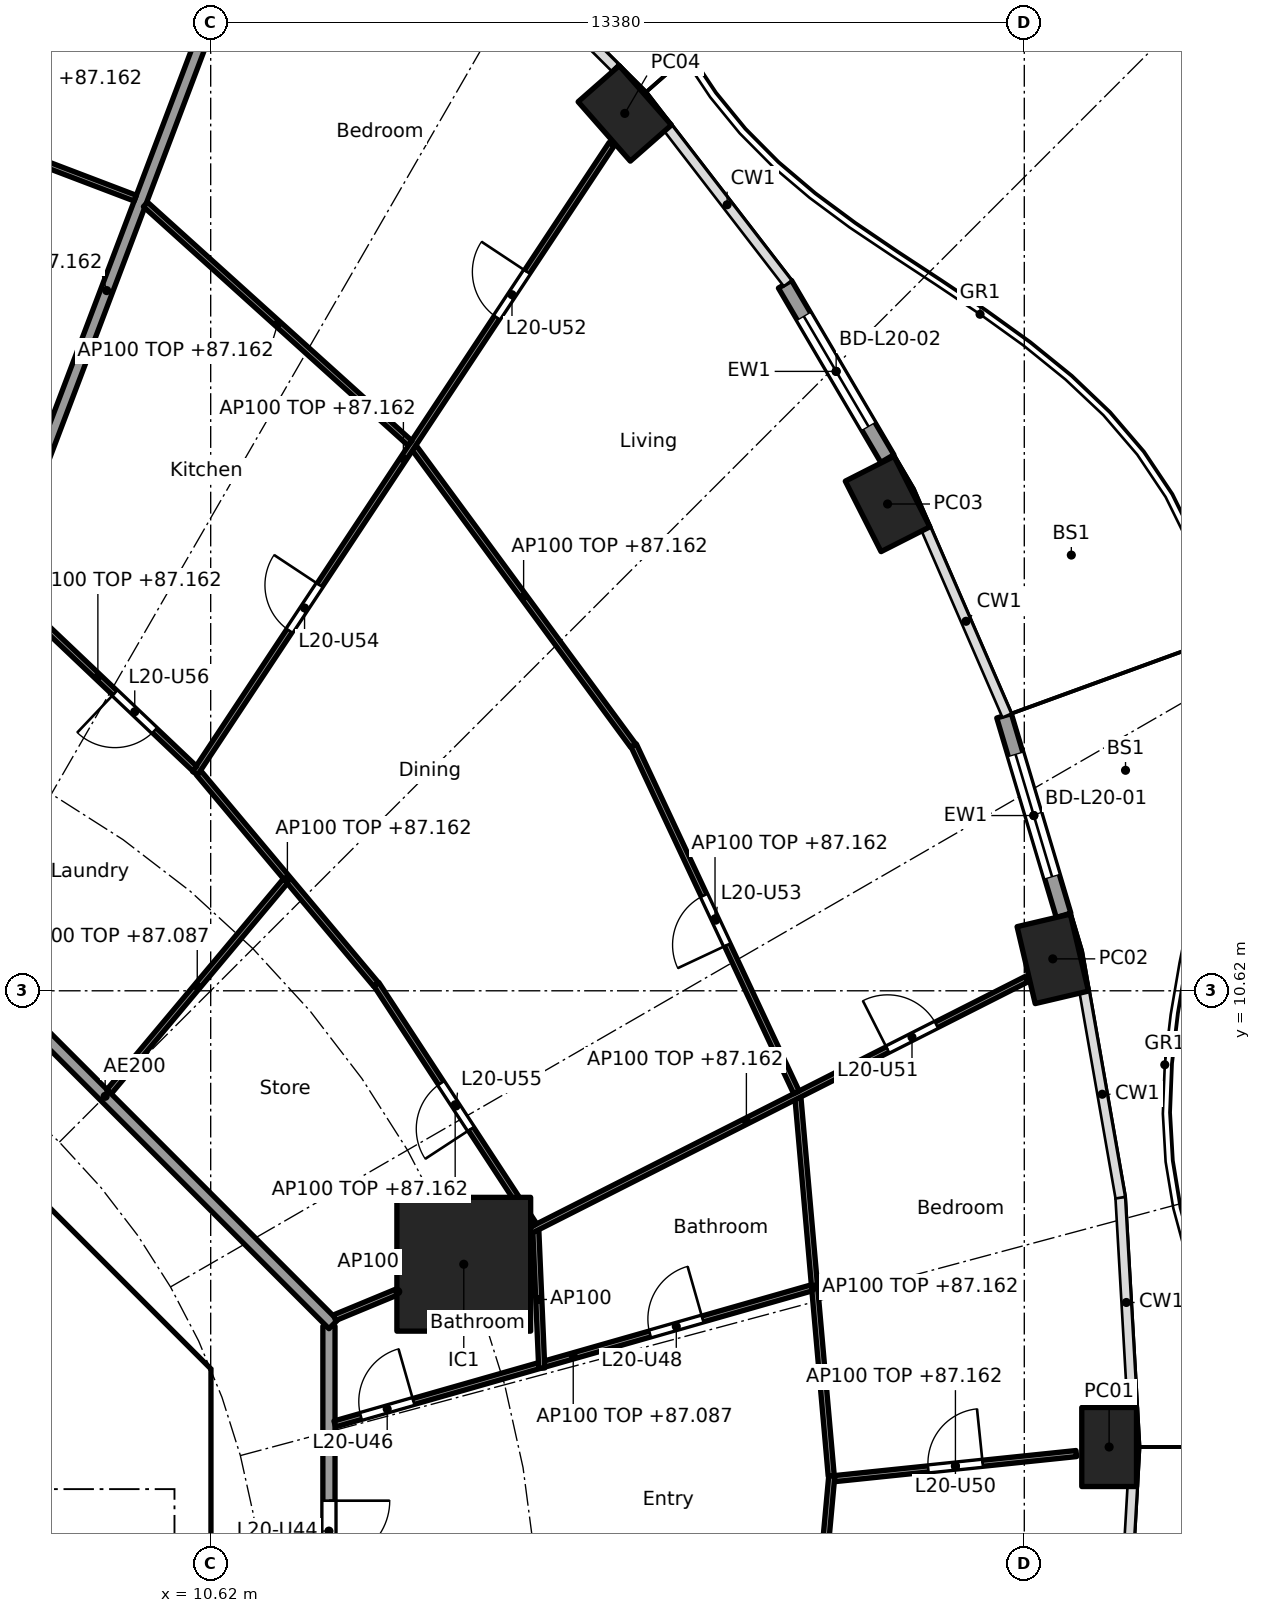
"""IFC4 building model, lengths in metres.
Left out: names, types, materials, properties, quantities, classifications, styles, units other than length and angle.
Written with IfcOpenShell. Run it as: python <this file> out.ifc"""

import sys

from ifc_helpers import new_model, si_unit, direction, frame, frame_2d, origin, origin_2d, place, context, subcontext, project, spatial, polyline, rectangle, hollow_rectangle, outline, extrude, element, fill, save


model = new_model("IFC4")
c1 = context("Model", 3, precision=1e-05, world=origin(), true_north=direction((0.0, 1.0)))
c2 = subcontext(c1, "Body", "Model", "MODEL_VIEW")
j1 = project(units=[si_unit("LENGTHUNIT", "METRE"), si_unit("PLANEANGLEUNIT", "RADIAN")], contexts=[c1])
p1 = place(None, origin())
s1 = spatial("IfcSite", under=j1, at=p1, CompositionType="ELEMENT")
p2 = place(p1, origin())
s2 = spatial("IfcBuilding", under=s1, at=p2, CompositionType="ELEMENT")
p3 = place(p2, frame((0.0, 0.0, 84.4)))
s3 = spatial("IfcBuildingStorey", under=s2, at=p3, CompositionType="ELEMENT", Elevation=84.4)
for number, where, z_axis, x_axis in (
    (1, (25.395, 3.118, 0.0), (0.0, 0.0, 1.0), (0.0, 1.0, 0.0)),
    (2, (24.468, 11.145, 0.0), (0.0, 0.0, 1.0), (-0.229, 0.973, 0.0)),
    (3, (21.751, 18.625, 0.0), (0.0, 0.0, 1.0), (-0.452, 0.892, 0.0)),
    (4, (17.43, 25.049, 0.0), (0.0, 0.0, 1.0), (-0.66, 0.751, 0.0)),
):
    element("IfcColumn", number, at=place(p3, frame(where, z_axis=z_axis, x_axis=x_axis)), inside=s3, PredefinedType="COLUMN", context=c2, shape_type="SweptSolid", body=[
        extrude(hollow_rectangle(XDim=1.3, YDim=0.9, WallThickness=0.045, at=origin_2d()), origin(), (0.0, 0.0, 1.0), 3.7),
    ])
p4 = place(p3, frame((14.782, 6.123, 0.0), z_axis=(0.0, 0.0, 1.0), x_axis=(1.0, 0.0, 0.0)))
e5 = element("IfcColumn", 5, at=p4, inside=s3, PredefinedType="COLUMN", context=c2, shape_type="SweptSolid", body=[
    extrude(rectangle(XDim=2.2, YDim=2.2, at=origin_2d()), origin(), (0.0, 0.0, 1.0), 3.7),
])
p5 = place(p3, frame((23.667, 15.142, 0.0), z_axis=(0.0, 0.0, 1.0), x_axis=(0.285882094477, -0.958264800594, 0.0)))
e6 = element("IfcWall", 6, at=p5, inside=s3, PredefinedType="SOLIDWALL", context=c2, shape_type="SweptSolid", body=[
    extrude(rectangle(XDim=3.424, YDim=0.25, at=frame_2d((1.712, 0.0))), origin(), (0.0, 0.0, 1.0), 3.44),
])
p6 = place(p5, frame((0.662, 0.0, 0.0)))
e7 = element("IfcOpeningElement", 7, at=p6, cuts=e6, PredefinedType="OPENING", context=c2, shape_type="SweptSolid", body=[
    extrude(rectangle(XDim=2.1, YDim=2.4, at=frame_2d((1.05, 1.2))), frame((0.0, 0.135, 0.0), z_axis=(0.0, -1.0, 0.0), x_axis=(1.0, 0.0, 0.0)), (0.0, 0.0, 1.0), 0.27),
])
p7 = place(p3, frame((20.064, 22.24, 0.0), z_axis=(0.0, 0.0, 1.0), x_axis=(0.506297921217, -0.862358634775, 0.0)))
e8 = element("IfcWall", 8, at=p7, inside=s3, PredefinedType="SOLIDWALL", context=c2, shape_type="SweptSolid", body=[
    extrude(rectangle(XDim=3.325, YDim=0.25, at=frame_2d((1.662, 0.0))), origin(), (0.0, 0.0, 1.0), 3.44),
])
p8 = place(p7, frame((0.612, 0.0, 0.0)))
e9 = element("IfcOpeningElement", 9, at=p8, cuts=e8, PredefinedType="OPENING", context=c2, shape_type="SweptSolid", body=[
    extrude(rectangle(XDim=2.1, YDim=2.4, at=frame_2d((1.05, 1.2))), frame((0.0, 0.135, 0.0), z_axis=(0.0, -1.0, 0.0), x_axis=(1.0, 0.0, 0.0)), (0.0, 0.0, 1.0), 0.27),
])
p9 = place(p3, frame((9.988, 4.613, 0.0), z_axis=(0.0, 0.0, 1.0), x_axis=(-0.707106781187, 0.707106781187, 0.0)))
e10 = element("IfcWall", 10, at=p9, inside=s3, PredefinedType="SHEAR", context=c2, shape_type="SweptSolid", body=[
    extrude(rectangle(XDim=7.602, YDim=0.6, at=frame_2d((3.801, 0.0))), origin(), (0.0, 0.0, 1.0), 3.44),
])
p10 = place(p9, frame((3.201, 0.0, 0.0)))
e11 = element("IfcOpeningElement", 11, at=p10, cuts=e10, PredefinedType="OPENING", context=c2, shape_type="SweptSolid", body=[
    extrude(rectangle(XDim=1.2, YDim=2.1, at=frame_2d((0.6, 1.05))), frame((0.0, 0.31, 0.0), z_axis=(0.0, -1.0, 0.0), x_axis=(1.0, 0.0, 0.0)), (0.0, 0.0, 1.0), 0.62),
])
p11 = place(p3, frame((6.7, 4.0, 0.0), z_axis=(0.0, 0.0, 1.0), x_axis=(1.0, 0.0, 0.0)))
e12 = element("IfcWall", 12, at=p11, inside=s3, PredefinedType="SOLIDWALL", context=c2, shape_type="SweptSolid", body=[
    extrude(rectangle(XDim=3.325, YDim=0.2, at=frame_2d((1.662, 0.0))), origin(), (0.0, 0.0, 1.0), 3.44),
])
p12 = place(p11, frame((1.25, 0.0, 0.0)))
e13 = element("IfcOpeningElement", 13, at=p12, cuts=e12, PredefinedType="OPENING", context=c2, shape_type="SweptSolid", body=[
    extrude(rectangle(XDim=1.1, YDim=2.1, at=frame_2d((0.55, 1.05))), frame((0.0, 0.11, 0.0), z_axis=(0.0, -1.0, 0.0), x_axis=(1.0, 0.0, 0.0)), (0.0, 0.0, 1.0), 0.22),
])
p13 = place(p3, origin())
e14 = element("IfcWall", 14, at=p13, inside=s3, PredefinedType="SHEAR", context=c2, shape_type="SweptSolid", body=[
    extrude(outline(polyline([(9.776, -4.401), (10.025, -4.152), (10.025, -3.801), (10.025, 4.152), (9.776, 4.401), (10.2, 4.825), (10.625, 4.401), (10.625, -4.401), (10.2, -4.825), (9.776, -4.401)])), origin(), (0.0, 0.0, 1.0), 3.44),
])
p14 = place(p3, frame((6.141, 14.829, 0.0), z_axis=(0.0, 0.0, 1.0), x_axis=(0.354477134193, 0.935064682968, 0.0)))
e15 = element("IfcWall", 15, at=p14, inside=s3, PredefinedType="PARTITIONING", context=c2, shape_type="SweptSolid", body=[
    extrude(rectangle(XDim=15.626, YDim=0.2, at=frame_2d((7.813, 0.0))), origin(), (0.0, 0.0, 1.0), 2.762),
])
p15 = place(p3, frame((12.565, -5.104, 0.0), z_axis=(0.0, 0.0, 1.0), x_axis=(0.0, 1.0, 0.0)))
e16 = element("IfcWall", 16, at=p15, inside=s3, PredefinedType="PARTITIONING", context=c2, shape_type="SweptSolid", body=[
    extrude(rectangle(XDim=10.209, YDim=0.2, at=frame_2d((5.104, 0.0))), origin(), (0.0, 0.0, 1.0), 3.44),
])
p16 = place(p15, frame((6.339, 0.0, 0.0)))
e17 = element("IfcOpeningElement", 17, at=p16, cuts=e16, PredefinedType="OPENING", context=c2, shape_type="SweptSolid", body=[
    extrude(rectangle(XDim=1.0, YDim=2.1, at=frame_2d((0.5, 1.05))), frame((0.0, 0.11, 0.0), z_axis=(0.0, -1.0, 0.0), x_axis=(1.0, 0.0, 0.0)), (0.0, 0.0, 1.0), 0.22),
])
p17 = place(p3, frame((12.635, 5.134, 0.0), z_axis=(0.0, 0.0, 1.0), x_axis=(-0.707106781187, 0.707106781187, 0.0)))
e18 = element("IfcWall", 18, at=p17, inside=s3, PredefinedType="PARTITIONING", context=c2, shape_type="SweptSolid", body=[
    extrude(rectangle(XDim=10.609, YDim=0.2, at=frame_2d((5.305, 0.0))), origin(), (0.0, 0.0, 1.0), 3.44),
])
p18 = place(p3, frame((20.879, 2.597, 0.0), z_axis=(0.0, 0.0, 1.0), x_axis=(0.994666546694, 0.103142914868, 0.0)))
e19 = element("IfcWall", 19, at=p18, inside=s3, PredefinedType="PARTITIONING", context=c2, shape_type="SweptSolid", body=[
    extrude(rectangle(XDim=3.998, YDim=0.1, at=frame_2d((1.999, 0.0))), origin(), (0.0, 0.0, 1.0), 2.762),
])
p19 = place(p18, frame((1.549, 0.0, 0.0)))
e20 = element("IfcOpeningElement", 20, at=p19, cuts=e19, PredefinedType="OPENING", context=c2, shape_type="SweptSolid", body=[
    extrude(rectangle(XDim=0.9, YDim=2.1, at=frame_2d((0.45, 1.05))), frame((0.0, 0.06, 0.0), z_axis=(0.0, -1.0, 0.0), x_axis=(1.0, 0.0, 0.0)), (0.0, 0.0, 1.0), 0.12),
])
p20 = place(p3, frame((20.825, 2.642, 0.0), z_axis=(0.0, 0.0, 1.0), x_axis=(-0.08776129045, 0.99614153407, 0.0)))
e21 = element("IfcWall", 21, at=p20, inside=s3, PredefinedType="PARTITIONING", context=c2, shape_type="SweptSolid", body=[
    extrude(rectangle(XDim=6.237, YDim=0.1, at=frame_2d((3.119, 0.0))), origin(), (0.0, 0.0, 1.0), 2.762),
])
p21 = place(p3, frame((20.834, 2.642, 0.0), z_axis=(0.0, 0.0, 1.0), x_axis=(-0.091385407685, -0.995815599025, 0.0)))
e22 = element("IfcWall", 22, at=p21, inside=s3, PredefinedType="PARTITIONING", context=c2, shape_type="SweptSolid", body=[
    extrude(rectangle(XDim=6.502, YDim=0.1, at=frame_2d((3.251, 0.0))), origin(), (0.0, 0.0, 1.0), 2.762),
])
p22 = place(p21, frame((1.201, 0.0, 0.0)))
e23 = element("IfcOpeningElement", 23, at=p22, cuts=e22, PredefinedType="OPENING", context=c2, shape_type="SweptSolid", body=[
    extrude(rectangle(XDim=0.9, YDim=2.1, at=frame_2d((0.45, 1.05))), frame((0.0, 0.06, 0.0), z_axis=(0.0, -1.0, 0.0), x_axis=(1.0, 0.0, 0.0)), (0.0, 0.0, 1.0), 0.12),
])
p23 = place(p3, frame((12.661, 3.497, 0.0), z_axis=(0.0, 0.0, 1.0), x_axis=(0.961626678623, 0.274361314621, 0.0)))
e24 = element("IfcWall", 24, at=p23, inside=s3, PredefinedType="PARTITIONING", context=c2, shape_type="SweptSolid", body=[
    extrude(rectangle(XDim=8.156, YDim=0.1, at=frame_2d((4.078, 0.0))), origin(), (0.0, 0.0, 1.0), 2.687),
])
p24 = place(p23, frame((0.446, 0.0, 0.0)))
e25 = element("IfcOpeningElement", 25, at=p24, cuts=e24, PredefinedType="OPENING", context=c2, shape_type="SweptSolid", body=[
    extrude(rectangle(XDim=0.9, YDim=2.1, at=frame_2d((0.45, 1.05))), frame((0.0, 0.06, 0.0), z_axis=(0.0, -1.0, 0.0), x_axis=(1.0, 0.0, 0.0)), (0.0, 0.0, 1.0), 0.12),
])
p25 = place(p23, frame((5.39, 0.0, 0.0)))
e26 = element("IfcOpeningElement", 26, at=p25, cuts=e24, PredefinedType="OPENING", context=c2, shape_type="SweptSolid", body=[
    extrude(rectangle(XDim=0.9, YDim=2.1, at=frame_2d((0.45, 1.05))), frame((0.0, 0.06, 0.0), z_axis=(0.0, -1.0, 0.0), x_axis=(1.0, 0.0, 0.0)), (0.0, 0.0, 1.0), 0.12),
])
p26 = place(p3, frame((16.064, 4.415, 0.0), z_axis=(0.0, 0.0, 1.0), x_axis=(-0.043118325477, 0.999069972528, 0.0)))
e27 = element("IfcWall", 27, at=p26, inside=s3, PredefinedType="PARTITIONING", context=c2, shape_type="SweptSolid", body=[
    extrude(rectangle(XDim=2.259, YDim=0.1, at=frame_2d((1.13, 0.0))), origin(), (0.0, 0.0, 1.0), 3.44),
])
p27 = place(p3, frame((12.657, 5.243, 0.0), z_axis=(0.0, 0.0, 1.0), x_axis=(0.923848837015, 0.382757529444, 0.0)))
e28 = element("IfcWall", 28, at=p27, inside=s3, PredefinedType="PARTITIONING", context=c2, shape_type="SweptSolid", body=[
    extrude(rectangle(XDim=2.25, YDim=0.1, at=frame_2d((1.125, 0.0))), origin(), (0.0, 0.0, 1.0), 3.44),
])
p28 = place(p3, frame((14.827, 6.146, 0.0), z_axis=(0.0, 0.0, 1.0), x_axis=(0.892068075337, 0.451901038906, 0.0)))
e29 = element("IfcWall", 29, at=p28, inside=s3, PredefinedType="PARTITIONING", context=c2, shape_type="SweptSolid", body=[
    extrude(rectangle(XDim=10.32, YDim=0.1, at=frame_2d((5.16, 0.0))), origin(), (0.0, 0.0, 1.0), 2.762),
])
p29 = place(p28, frame((7.763, 0.0, 0.0)))
e30 = element("IfcOpeningElement", 30, at=p29, cuts=e29, PredefinedType="OPENING", context=c2, shape_type="SweptSolid", body=[
    extrude(rectangle(XDim=0.9, YDim=2.1, at=frame_2d((0.45, 1.05))), frame((0.0, 0.06, 0.0), z_axis=(0.0, -1.0, 0.0), x_axis=(1.0, 0.0, 0.0)), (0.0, 0.0, 1.0), 0.12),
])
p30 = place(p3, frame((15.938, 6.764, 0.0), z_axis=(0.0, 0.0, 1.0), x_axis=(-0.547472878942, 0.836823426311, 0.0)))
e31 = element("IfcWall", 31, at=p30, inside=s3, PredefinedType="PARTITIONING", context=c2, shape_type="SweptSolid", body=[
    extrude(rectangle(XDim=4.738, YDim=0.1, at=frame_2d((2.369, 0.0))), origin(), (0.0, 0.0, 1.0), 2.762),
])
p31 = place(p30, frame((1.894, 0.0, 0.0)))
e32 = element("IfcOpeningElement", 32, at=p31, cuts=e31, PredefinedType="OPENING", context=c2, shape_type="SweptSolid", body=[
    extrude(rectangle(XDim=0.9, YDim=2.1, at=frame_2d((0.45, 1.05))), frame((0.0, 0.06, 0.0), z_axis=(0.0, -1.0, 0.0), x_axis=(1.0, 0.0, 0.0)), (0.0, 0.0, 1.0), 0.12),
])
p32 = place(p3, frame((20.252, 8.95, 0.0), z_axis=(0.0, 0.0, 1.0), x_axis=(-0.424580709335, 0.905390093419, 0.0)))
e33 = element("IfcWall", 33, at=p32, inside=s3, PredefinedType="PARTITIONING", context=c2, shape_type="SweptSolid", body=[
    extrude(rectangle(XDim=6.304, YDim=0.1, at=frame_2d((3.152, 0.0))), origin(), (0.0, 0.0, 1.0), 2.762),
])
p33 = place(p32, frame((2.677, 0.0, 0.0)))
e34 = element("IfcOpeningElement", 34, at=p33, cuts=e33, PredefinedType="OPENING", context=c2, shape_type="SweptSolid", body=[
    extrude(rectangle(XDim=0.9, YDim=2.1, at=frame_2d((0.45, 1.05))), frame((0.0, 0.06, 0.0), z_axis=(0.0, -1.0, 0.0), x_axis=(1.0, 0.0, 0.0)), (0.0, 0.0, 1.0), 0.12),
])
p34 = place(p3, frame((13.339, 10.725, 0.0), z_axis=(0.0, 0.0, 1.0), x_axis=(-0.642515455924, 0.766272724882, 0.0)))
e35 = element("IfcWall", 35, at=p34, inside=s3, PredefinedType="PARTITIONING", context=c2, shape_type="SweptSolid", body=[
    extrude(rectangle(XDim=4.537, YDim=0.1, at=frame_2d((2.269, 0.0))), origin(), (0.0, 0.0, 1.0), 2.762),
])
p35 = place(p3, frame((17.567, 14.653, 0.0), z_axis=(0.0, 0.0, 1.0), x_axis=(-0.592391983588, 0.80564988536, 0.0)))
e36 = element("IfcWall", 36, at=p35, inside=s3, PredefinedType="PARTITIONING", context=c2, shape_type="SweptSolid", body=[
    extrude(rectangle(XDim=6.08, YDim=0.1, at=frame_2d((3.04, 0.0))), origin(), (0.0, 0.0, 1.0), 2.762),
])
p36 = place(p3, frame((8.949, 8.961, 0.0), z_axis=(0.0, 0.0, 1.0), x_axis=(0.642048217601, 0.766664259162, 0.0)))
e37 = element("IfcWall", 37, at=p36, inside=s3, PredefinedType="PARTITIONING", context=c2, shape_type="SweptSolid", body=[
    extrude(rectangle(XDim=4.518, YDim=0.1, at=frame_2d((2.259, 0.0))), origin(), (0.0, 0.0, 1.0), 2.687),
])
p37 = place(p3, frame((10.364, 14.198, 0.0), z_axis=(0.0, 0.0, 1.0), x_axis=(0.552104552927, 0.833774887267, 0.0)))
e38 = element("IfcWall", 38, at=p37, inside=s3, PredefinedType="PARTITIONING", context=c2, shape_type="SweptSolid", body=[
    extrude(rectangle(XDim=12.407, YDim=0.1, at=frame_2d((6.203, 0.0))), origin(), (0.0, 0.0, 1.0), 2.762),
])
p38 = place(p37, frame((8.988, 0.0, 0.0)))
e39 = element("IfcOpeningElement", 39, at=p38, cuts=e38, PredefinedType="OPENING", context=c2, shape_type="SweptSolid", body=[
    extrude(rectangle(XDim=0.9, YDim=2.1, at=frame_2d((0.45, 1.05))), frame((0.0, 0.06, 0.0), z_axis=(0.0, -1.0, 0.0), x_axis=(1.0, 0.0, 0.0)), (0.0, 0.0, 1.0), 0.12),
])
p39 = place(p37, frame((2.809, 0.0, 0.0)))
e40 = element("IfcOpeningElement", 40, at=p39, cuts=e38, PredefinedType="OPENING", context=c2, shape_type="SweptSolid", body=[
    extrude(rectangle(XDim=0.9, YDim=2.1, at=frame_2d((0.45, 1.05))), frame((0.0, 0.06, 0.0), z_axis=(0.0, -1.0, 0.0), x_axis=(1.0, 0.0, 0.0)), (0.0, 0.0, 1.0), 0.12),
])
p40 = place(p3, frame((10.355, 14.274, 0.0), z_axis=(0.0, 0.0, 1.0), x_axis=(-0.725206433622, 0.688531501555, 0.0)))
e41 = element("IfcWall", 41, at=p40, inside=s3, PredefinedType="PARTITIONING", context=c2, shape_type="SweptSolid", body=[
    extrude(rectangle(XDim=4.387, YDim=0.1, at=frame_2d((2.193, 0.0))), origin(), (0.0, 0.0, 1.0), 2.762),
])
p41 = place(p40, frame((0.907, 0.0, 0.0)))
e42 = element("IfcOpeningElement", 42, at=p41, cuts=e41, PredefinedType="OPENING", context=c2, shape_type="SweptSolid", body=[
    extrude(rectangle(XDim=0.9, YDim=2.1, at=frame_2d((0.45, 1.05))), frame((0.0, 0.06, 0.0), z_axis=(0.0, -1.0, 0.0), x_axis=(1.0, 0.0, 0.0)), (0.0, 0.0, 1.0), 0.12),
])
p42 = place(p3, frame((13.898, 19.625, 0.0), z_axis=(0.0, 0.0, 1.0), x_axis=(-0.742396654702, 0.669960601146, 0.0)))
e43 = element("IfcWall", 43, at=p42, inside=s3, PredefinedType="PARTITIONING", context=c2, shape_type="SweptSolid", body=[
    extrude(rectangle(XDim=5.861, YDim=0.1, at=frame_2d((2.931, 0.0))), origin(), (0.0, 0.0, 1.0), 2.762),
])
p43 = place(p3, frame((9.379, 23.655, 0.0), z_axis=(0.0, 0.0, 1.0), x_axis=(-0.934613076136, 0.355666132653, 0.0)))
e44 = element("IfcWall", 44, at=p43, inside=s3, PredefinedType="PARTITIONING", context=c2, shape_type="SweptSolid", body=[
    extrude(rectangle(XDim=5.366, YDim=0.1, at=frame_2d((2.683, 0.0))), origin(), (0.0, 0.0, 1.0), 2.762),
])
p44 = place(p6, origin())
e45 = element("IfcDoor", 45, at=p44, inside=s3, OperationType="SLIDING_TO_LEFT", PredefinedType="DOOR", context=c2, shape_type="SweptSolid", body=[
    extrude(rectangle(XDim=2.1, YDim=2.4, at=frame_2d((1.05, 1.2))), frame((0.0, 0.025, 0.0), z_axis=(0.0, -1.0, 0.0), x_axis=(1.0, 0.0, 0.0)), (0.0, 0.0, 1.0), 0.05),
])
fill(e7, e45)
p45 = place(p8, origin())
e46 = element("IfcDoor", 46, at=p45, inside=s3, OperationType="SLIDING_TO_LEFT", PredefinedType="DOOR", context=c2, shape_type="SweptSolid", body=[
    extrude(rectangle(XDim=2.1, YDim=2.4, at=frame_2d((1.05, 1.2))), frame((0.0, 0.025, 0.0), z_axis=(0.0, -1.0, 0.0), x_axis=(1.0, 0.0, 0.0)), (0.0, 0.0, 1.0), 0.05),
])
fill(e9, e46)
p46 = place(p12, frame((1.1, 0.0, 0.0), x_axis=(-1.0, 0.0, 0.0)))
e47 = element("IfcDoor", 47, at=p46, inside=s3, OperationType="SINGLE_SWING_LEFT", PredefinedType="DOOR", context=c2, shape_type="SweptSolid", body=[
    extrude(rectangle(XDim=1.1, YDim=2.1, at=frame_2d((0.55, 1.05))), frame((0.0, 0.025, 0.0), z_axis=(0.0, -1.0, 0.0), x_axis=(1.0, 0.0, 0.0)), (0.0, 0.0, 1.0), 0.05),
])
fill(e13, e47)
p47 = place(p16, frame((1.0, 0.0, 0.0), x_axis=(-1.0, 0.0, 0.0)))
e48 = element("IfcDoor", 48, at=p47, inside=s3, OperationType="SINGLE_SWING_LEFT", PredefinedType="DOOR", context=c2, shape_type="SweptSolid", body=[
    extrude(rectangle(XDim=1.0, YDim=2.1, at=frame_2d((0.5, 1.05))), frame((0.0, 0.025, 0.0), z_axis=(0.0, -1.0, 0.0), x_axis=(1.0, 0.0, 0.0)), (0.0, 0.0, 1.0), 0.05),
])
fill(e17, e48)
p48 = place(p24, origin())
e49 = element("IfcDoor", 49, at=p48, inside=s3, OperationType="SINGLE_SWING_RIGHT", PredefinedType="DOOR", context=c2, shape_type="SweptSolid", body=[
    extrude(rectangle(XDim=0.9, YDim=2.1, at=frame_2d((0.45, 1.05))), frame((0.0, 0.025, 0.0), z_axis=(0.0, -1.0, 0.0), x_axis=(1.0, 0.0, 0.0)), (0.0, 0.0, 1.0), 0.05),
])
fill(e25, e49)
p49 = place(p25, origin())
e50 = element("IfcDoor", 50, at=p49, inside=s3, OperationType="SINGLE_SWING_RIGHT", PredefinedType="DOOR", context=c2, shape_type="SweptSolid", body=[
    extrude(rectangle(XDim=0.9, YDim=2.1, at=frame_2d((0.45, 1.05))), frame((0.0, 0.025, 0.0), z_axis=(0.0, -1.0, 0.0), x_axis=(1.0, 0.0, 0.0)), (0.0, 0.0, 1.0), 0.05),
])
fill(e26, e50)
p50 = place(p19, origin())
e51 = element("IfcDoor", 51, at=p50, inside=s3, OperationType="SINGLE_SWING_RIGHT", PredefinedType="DOOR", context=c2, shape_type="SweptSolid", body=[
    extrude(rectangle(XDim=0.9, YDim=2.1, at=frame_2d((0.45, 1.05))), frame((0.0, 0.025, 0.0), z_axis=(0.0, -1.0, 0.0), x_axis=(1.0, 0.0, 0.0)), (0.0, 0.0, 1.0), 0.05),
])
fill(e20, e51)
p51 = place(p29, origin())
e52 = element("IfcDoor", 52, at=p51, inside=s3, OperationType="SINGLE_SWING_LEFT", PredefinedType="DOOR", context=c2, shape_type="SweptSolid", body=[
    extrude(rectangle(XDim=0.9, YDim=2.1, at=frame_2d((0.45, 1.05))), frame((0.0, 0.025, 0.0), z_axis=(0.0, -1.0, 0.0), x_axis=(1.0, 0.0, 0.0)), (0.0, 0.0, 1.0), 0.05),
])
fill(e30, e52)
p52 = place(p38, origin())
e53 = element("IfcDoor", 53, at=p52, inside=s3, OperationType="SINGLE_SWING_RIGHT", PredefinedType="DOOR", context=c2, shape_type="SweptSolid", body=[
    extrude(rectangle(XDim=0.9, YDim=2.1, at=frame_2d((0.45, 1.05))), frame((0.0, 0.025, 0.0), z_axis=(0.0, -1.0, 0.0), x_axis=(1.0, 0.0, 0.0)), (0.0, 0.0, 1.0), 0.05),
])
fill(e39, e53)
p53 = place(p33, origin())
e54 = element("IfcDoor", 54, at=p53, inside=s3, OperationType="SINGLE_SWING_LEFT", PredefinedType="DOOR", context=c2, shape_type="SweptSolid", body=[
    extrude(rectangle(XDim=0.9, YDim=2.1, at=frame_2d((0.45, 1.05))), frame((0.0, 0.025, 0.0), z_axis=(0.0, -1.0, 0.0), x_axis=(1.0, 0.0, 0.0)), (0.0, 0.0, 1.0), 0.05),
])
fill(e34, e54)
p54 = place(p39, origin())
e55 = element("IfcDoor", 55, at=p54, inside=s3, OperationType="SINGLE_SWING_RIGHT", PredefinedType="DOOR", context=c2, shape_type="SweptSolid", body=[
    extrude(rectangle(XDim=0.9, YDim=2.1, at=frame_2d((0.45, 1.05))), frame((0.0, 0.025, 0.0), z_axis=(0.0, -1.0, 0.0), x_axis=(1.0, 0.0, 0.0)), (0.0, 0.0, 1.0), 0.05),
])
fill(e40, e55)
p55 = place(p31, origin())
e56 = element("IfcDoor", 56, at=p55, inside=s3, OperationType="SINGLE_SWING_LEFT", PredefinedType="DOOR", context=c2, shape_type="SweptSolid", body=[
    extrude(rectangle(XDim=0.9, YDim=2.1, at=frame_2d((0.45, 1.05))), frame((0.0, 0.025, 0.0), z_axis=(0.0, -1.0, 0.0), x_axis=(1.0, 0.0, 0.0)), (0.0, 0.0, 1.0), 0.05),
])
fill(e32, e56)
p56 = place(p41, origin())
e57 = element("IfcDoor", 57, at=p56, inside=s3, OperationType="SINGLE_SWING_RIGHT", PredefinedType="DOOR", context=c2, shape_type="SweptSolid", body=[
    extrude(rectangle(XDim=0.9, YDim=2.1, at=frame_2d((0.45, 1.05))), frame((0.0, 0.025, 0.0), z_axis=(0.0, -1.0, 0.0), x_axis=(1.0, 0.0, 0.0)), (0.0, 0.0, 1.0), 0.05),
])
fill(e42, e57)
save(model, sys.argv[1])
